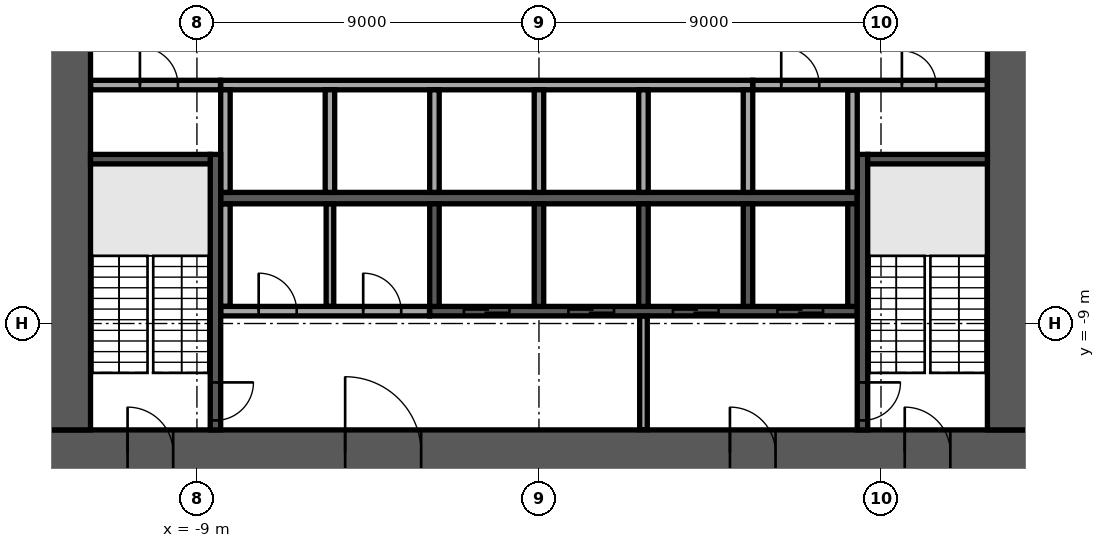
"""IFC4 building model, lengths in metres.
Left out: names, types, materials, properties, quantities, classifications, styles, units other than length and angle.
Written with IfcOpenShell. Run it as: python <this file> out.ifc"""

import sys

from ifc_helpers import new_model, si_unit, direction, frame, frame_2d, origin, place, context, subcontext, project, spatial, rectangle, extrude, element, fill, save


model = new_model("IFC4")
c1 = context("Model", 3, precision=1e-05, world=origin(), true_north=direction((0.0, 1.0)))
c2 = subcontext(c1, "Body", "Model", "MODEL_VIEW")
j1 = project(units=[si_unit("LENGTHUNIT", "METRE"), si_unit("PLANEANGLEUNIT", "RADIAN")], contexts=[c1])
p1 = place(None, origin())
s1 = spatial("IfcSite", under=j1, at=p1, CompositionType="ELEMENT")
p2 = place(p1, origin())
s2 = spatial("IfcBuilding", under=s1, at=p2, CompositionType="ELEMENT")
p3 = place(p2, frame((0.0, 0.0, 9.0)))
s3 = spatial("IfcBuildingStorey", under=s2, at=p3, CompositionType="ELEMENT", Elevation=9.0)
p4 = place(p3, frame((-13.0, -12.4, 0.0), z_axis=(0.0, 0.0, 1.0), x_axis=(1.0, 0.0, 0.0)))
e1 = element("IfcWall", 1, at=p4, inside=s3, PredefinedType="SHEAR", context=c2, shape_type="SweptSolid", body=[
    extrude(rectangle(XDim=26.0, YDim=1.2, at=frame_2d((13.0, 0.0))), origin(), (0.0, 0.0, 1.0), 4.1),
])
p5 = place(p4, frame((7.9, 0.0, 0.0)))
e2 = element("IfcOpeningElement", 2, at=p5, cuts=e1, PredefinedType="OPENING", context=c2, shape_type="SweptSolid", body=[
    extrude(rectangle(XDim=2.0, YDim=2.1, at=frame_2d((1.0, 1.05))), frame((0.0, 0.61, 0.0), z_axis=(0.0, -1.0, 0.0), x_axis=(1.0, 0.0, 0.0)), (0.0, 0.0, 1.0), 1.22),
])
p6 = place(p4, frame((18.025, 0.0, 0.0)))
e3 = element("IfcOpeningElement", 3, at=p6, cuts=e1, PredefinedType="OPENING", context=c2, shape_type="SweptSolid", body=[
    extrude(rectangle(XDim=1.2, YDim=2.1, at=frame_2d((0.6, 1.05))), frame((0.0, 0.61, 0.0), z_axis=(0.0, -1.0, 0.0), x_axis=(1.0, 0.0, 0.0)), (0.0, 0.0, 1.0), 1.22),
])
p7 = place(p4, frame((2.175, 0.0, 0.0)))
e4 = element("IfcOpeningElement", 4, at=p7, cuts=e1, PredefinedType="OPENING", context=c2, shape_type="SweptSolid", body=[
    extrude(rectangle(XDim=1.2, YDim=2.1, at=frame_2d((0.6, 1.05))), frame((0.0, 0.61, 0.0), z_axis=(0.0, -1.0, 0.0), x_axis=(1.0, 0.0, 0.0)), (0.0, 0.0, 1.0), 1.22),
])
p8 = place(p4, frame((22.625, 0.0, 0.0)))
e5 = element("IfcOpeningElement", 5, at=p8, cuts=e1, PredefinedType="OPENING", context=c2, shape_type="SweptSolid", body=[
    extrude(rectangle(XDim=1.2, YDim=2.1, at=frame_2d((0.6, 1.05))), frame((0.0, 0.61, 0.0), z_axis=(0.0, -1.0, 0.0), x_axis=(1.0, 0.0, 0.0)), (0.0, 0.0, 1.0), 1.22),
])
p9 = place(p3, frame((12.4, -11.8, 0.0), z_axis=(0.0, 0.0, 1.0), x_axis=(0.0, 1.0, 0.0)))
e6 = element("IfcWall", 6, at=p9, inside=s3, PredefinedType="SHEAR", context=c2, shape_type="SweptSolid", body=[
    extrude(rectangle(XDim=23.6, YDim=1.2, at=frame_2d((11.8, 0.0))), origin(), (0.0, 0.0, 1.0), 4.1),
])
p10 = place(p9, frame((10.6, 0.0, 0.0)))
e7 = element("IfcOpeningElement", 7, at=p10, cuts=e6, PredefinedType="OPENING", context=c2, shape_type="SweptSolid", body=[
    extrude(rectangle(XDim=2.4, YDim=2.4, at=frame_2d((1.2, 1.2))), frame((0.0, 0.61, 0.0), z_axis=(0.0, -1.0, 0.0), x_axis=(1.0, 0.0, 0.0)), (0.0, 0.0, 1.0), 1.22),
])
p11 = place(p3, frame((-12.4, -11.8, 0.0), z_axis=(0.0, 0.0, 1.0), x_axis=(0.0, 1.0, 0.0)))
e8 = element("IfcWall", 8, at=p11, inside=s3, PredefinedType="SHEAR", context=c2, shape_type="SweptSolid", body=[
    extrude(rectangle(XDim=23.6, YDim=1.2, at=frame_2d((11.8, 0.0))), origin(), (0.0, 0.0, 1.0), 4.1),
])
p12 = place(p11, frame((10.6, 0.0, 0.0)))
e9 = element("IfcOpeningElement", 9, at=p12, cuts=e8, PredefinedType="OPENING", context=c2, shape_type="SweptSolid", body=[
    extrude(rectangle(XDim=2.4, YDim=2.4, at=frame_2d((1.2, 1.2))), frame((0.0, 0.61, 0.0), z_axis=(0.0, -1.0, 0.0), x_axis=(1.0, 0.0, 0.0)), (0.0, 0.0, 1.0), 1.22),
])
p13 = place(p3, frame((-8.375, -5.7, 0.0), z_axis=(0.0, 0.0, 1.0), x_axis=(1.0, 0.0, 0.0)))
e10 = element("IfcWall", 10, at=p13, inside=s3, PredefinedType="SOLIDWALL", context=c2, shape_type="SweptSolid", body=[
    extrude(rectangle(XDim=16.75, YDim=0.3, at=frame_2d((8.375, 0.0))), origin(), (0.0, 0.0, 1.0), 4.1),
])
p14 = place(p3, frame((-8.375, -2.725, 0.0), z_axis=(0.0, 0.0, 1.0), x_axis=(1.0, 0.0, 0.0)))
e11 = element("IfcWall", 11, at=p14, inside=s3, PredefinedType="SOLIDWALL", context=c2, shape_type="SweptSolid", body=[
    extrude(rectangle(XDim=14.0, YDim=0.25, at=frame_2d((7.0, 0.0))), origin(), (0.0, 0.0, 1.0), 4.1),
])
for number, where, z_axis, x_axis in (
    (12, (-8.25, -5.55, 0.0), (0.0, 0.0, 1.0), (0.0, 1.0, 0.0)),
    (13, (-5.5, -5.55, 0.0), (0.0, 0.0, 1.0), (0.0, 1.0, 0.0)),
    (14, (-2.75, -5.55, 0.0), (0.0, 0.0, 1.0), (0.0, 1.0, 0.0)),
    (15, (0.0, -5.55, 0.0), (0.0, 0.0, 1.0), (0.0, 1.0, 0.0)),
    (16, (2.75, -5.55, 0.0), (0.0, 0.0, 1.0), (0.0, 1.0, 0.0)),
    (17, (5.5, -5.55, 0.0), (0.0, 0.0, 1.0), (0.0, 1.0, 0.0)),
):
    element("IfcWall", number, at=place(p3, frame(where, z_axis=z_axis, x_axis=x_axis)), inside=s3, PredefinedType="SOLIDWALL", context=c2, shape_type="SweptSolid", body=[
        extrude(rectangle(XDim=2.7, YDim=0.25, at=frame_2d((1.35, 0.0))), origin(), (0.0, 0.0, 1.0), 4.1),
    ])
p15 = place(p3, frame((-2.875, -8.675, 0.0), z_axis=(0.0, 0.0, 1.0), x_axis=(1.0, 0.0, 0.0)))
e18 = element("IfcWall", 18, at=p15, inside=s3, PredefinedType="SOLIDWALL", context=c2, shape_type="SweptSolid", body=[
    extrude(rectangle(XDim=11.25, YDim=0.25, at=frame_2d((5.625, 0.0))), origin(), (0.0, 0.0, 1.0), 4.1),
])
p16 = place(p15, frame((0.9, 0.0, 0.0)))
e19 = element("IfcOpeningElement", 19, at=p16, cuts=e18, PredefinedType="OPENING", context=c2, shape_type="SweptSolid", body=[
    extrude(rectangle(XDim=1.2, YDim=2.1, at=frame_2d((0.6, 1.05))), frame((0.0, 0.135, 0.0), z_axis=(0.0, -1.0, 0.0), x_axis=(1.0, 0.0, 0.0)), (0.0, 0.0, 1.0), 0.27),
])
p17 = place(p15, frame((3.65, 0.0, 0.0)))
e20 = element("IfcOpeningElement", 20, at=p17, cuts=e18, PredefinedType="OPENING", context=c2, shape_type="SweptSolid", body=[
    extrude(rectangle(XDim=1.2, YDim=2.1, at=frame_2d((0.6, 1.05))), frame((0.0, 0.135, 0.0), z_axis=(0.0, -1.0, 0.0), x_axis=(1.0, 0.0, 0.0)), (0.0, 0.0, 1.0), 0.27),
])
p18 = place(p15, frame((6.4, 0.0, 0.0)))
e21 = element("IfcOpeningElement", 21, at=p18, cuts=e18, PredefinedType="OPENING", context=c2, shape_type="SweptSolid", body=[
    extrude(rectangle(XDim=1.2, YDim=2.1, at=frame_2d((0.6, 1.05))), frame((0.0, 0.135, 0.0), z_axis=(0.0, -1.0, 0.0), x_axis=(1.0, 0.0, 0.0)), (0.0, 0.0, 1.0), 0.27),
])
p19 = place(p15, frame((9.15, 0.0, 0.0)))
e22 = element("IfcOpeningElement", 22, at=p19, cuts=e18, PredefinedType="OPENING", context=c2, shape_type="SweptSolid", body=[
    extrude(rectangle(XDim=1.2, YDim=2.1, at=frame_2d((0.6, 1.05))), frame((0.0, 0.135, 0.0), z_axis=(0.0, -1.0, 0.0), x_axis=(1.0, 0.0, 0.0)), (0.0, 0.0, 1.0), 0.27),
])
for number, where, z_axis, x_axis in (
    (23, (-2.75, -8.55, 0.0), (0.0, 0.0, 1.0), (0.0, 1.0, 0.0)),
    (24, (0.0, -8.55, 0.0), (0.0, 0.0, 1.0), (0.0, 1.0, 0.0)),
    (25, (2.75, -8.55, 0.0), (0.0, 0.0, 1.0), (0.0, 1.0, 0.0)),
    (26, (5.5, -8.55, 0.0), (0.0, 0.0, 1.0), (0.0, 1.0, 0.0)),
    (27, (8.25, -8.55, 0.0), (0.0, 0.0, 1.0), (0.0, 1.0, 0.0)),
):
    element("IfcWall", number, at=place(p3, frame(where, z_axis=z_axis, x_axis=x_axis)), inside=s3, PredefinedType="SOLIDWALL", context=c2, shape_type="SweptSolid", body=[
        extrude(rectangle(XDim=2.7, YDim=0.25, at=frame_2d((1.35, 0.0))), origin(), (0.0, 0.0, 1.0), 4.1),
    ])
p20 = place(p3, frame((-8.512, -4.55, 0.0), z_axis=(0.0, 0.0, 1.0), x_axis=(0.0, -1.0, 0.0)))
e28 = element("IfcWall", 28, at=p20, inside=s3, PredefinedType="SOLIDWALL", context=c2, shape_type="SweptSolid", body=[
    extrude(rectangle(XDim=7.25, YDim=0.275, at=frame_2d((3.625, 0.0))), origin(), (0.0, 0.0, 1.0), 4.1),
])
p21 = place(p20, frame((6.0, 0.0, 0.0)))
e29 = element("IfcOpeningElement", 29, at=p21, cuts=e28, PredefinedType="OPENING", context=c2, shape_type="SweptSolid", body=[
    extrude(rectangle(XDim=1.0, YDim=2.1, at=frame_2d((0.5, 1.05))), frame((0.0, 0.147, 0.0), z_axis=(0.0, -1.0, 0.0), x_axis=(1.0, 0.0, 0.0)), (0.0, 0.0, 1.0), 0.295),
])
p22 = place(p3, frame((-8.65, -4.675, 0.0), z_axis=(0.0, 0.0, 1.0), x_axis=(-1.0, 0.0, 0.0)))
e30 = element("IfcWall", 30, at=p22, inside=s3, PredefinedType="SOLIDWALL", context=c2, shape_type="SweptSolid", body=[
    extrude(rectangle(XDim=3.15, YDim=0.25, at=frame_2d((1.575, 0.0))), origin(), (0.0, 0.0, 1.0), 4.1),
])
p23 = place(p3, frame((8.512, -4.55, 0.0), z_axis=(0.0, 0.0, 1.0), x_axis=(0.0, -1.0, 0.0)))
e31 = element("IfcWall", 31, at=p23, inside=s3, PredefinedType="SOLIDWALL", context=c2, shape_type="SweptSolid", body=[
    extrude(rectangle(XDim=7.25, YDim=0.275, at=frame_2d((3.625, 0.0))), origin(), (0.0, 0.0, 1.0), 4.1),
])
p24 = place(p23, frame((6.0, 0.0, 0.0)))
e32 = element("IfcOpeningElement", 32, at=p24, cuts=e31, PredefinedType="OPENING", context=c2, shape_type="SweptSolid", body=[
    extrude(rectangle(XDim=1.0, YDim=2.1, at=frame_2d((0.5, 1.05))), frame((0.0, 0.147, 0.0), z_axis=(0.0, -1.0, 0.0), x_axis=(1.0, 0.0, 0.0)), (0.0, 0.0, 1.0), 0.295),
])
p25 = place(p3, frame((8.65, -4.675, 0.0), z_axis=(0.0, 0.0, 1.0), x_axis=(1.0, 0.0, 0.0)))
e33 = element("IfcWall", 33, at=p25, inside=s3, PredefinedType="SOLIDWALL", context=c2, shape_type="SweptSolid", body=[
    extrude(rectangle(XDim=3.15, YDim=0.25, at=frame_2d((1.575, 0.0))), origin(), (0.0, 0.0, 1.0), 4.1),
])
p26 = place(p3, frame((2.75, -11.795, 0.0), z_axis=(0.0, 0.0, 1.0), x_axis=(0.0, 1.0, 0.0)))
e34 = element("IfcWall", 34, at=p26, inside=s3, PredefinedType="PARTITIONING", context=c2, shape_type="SweptSolid", body=[
    extrude(rectangle(XDim=2.99, YDim=0.2, at=frame_2d((1.495, 0.0))), origin(), (0.0, 0.0, 1.0), 4.1),
])
p27 = place(p3, frame((-8.37, -8.675, 0.0), z_axis=(0.0, 0.0, 1.0), x_axis=(1.0, 0.0, 0.0)))
e35 = element("IfcWall", 35, at=p27, inside=s3, PredefinedType="PARTITIONING", context=c2, shape_type="SweptSolid", body=[
    extrude(rectangle(XDim=5.49, YDim=0.25, at=frame_2d((2.745, 0.0))), origin(), (0.0, 0.0, 1.0), 4.1),
])
p28 = place(p27, frame((0.995, 0.0, 0.0)))
e36 = element("IfcOpeningElement", 36, at=p28, cuts=e35, PredefinedType="OPENING", context=c2, shape_type="SweptSolid", body=[
    extrude(rectangle(XDim=1.0, YDim=2.1, at=frame_2d((0.5, 1.05))), frame((0.0, 0.135, 0.0), z_axis=(0.0, -1.0, 0.0), x_axis=(1.0, 0.0, 0.0)), (0.0, 0.0, 1.0), 0.27),
])
p29 = place(p27, frame((3.745, 0.0, 0.0)))
e37 = element("IfcOpeningElement", 37, at=p29, cuts=e35, PredefinedType="OPENING", context=c2, shape_type="SweptSolid", body=[
    extrude(rectangle(XDim=1.0, YDim=2.1, at=frame_2d((0.5, 1.05))), frame((0.0, 0.135, 0.0), z_axis=(0.0, -1.0, 0.0), x_axis=(1.0, 0.0, 0.0)), (0.0, 0.0, 1.0), 0.27),
])
p30 = place(p3, frame((-8.25, -8.545, 0.0), z_axis=(0.0, 0.0, 1.0), x_axis=(0.0, 1.0, 0.0)))
e38 = element("IfcWall", 38, at=p30, inside=s3, PredefinedType="PARTITIONING", context=c2, shape_type="SweptSolid", body=[
    extrude(rectangle(XDim=2.69, YDim=0.25, at=frame_2d((1.345, 0.0))), origin(), (0.0, 0.0, 1.0), 4.1),
])
p31 = place(p3, frame((-5.5, -8.545, 0.0), z_axis=(0.0, 0.0, 1.0), x_axis=(0.0, 1.0, 0.0)))
e39 = element("IfcWall", 39, at=p31, inside=s3, PredefinedType="PARTITIONING", context=c2, shape_type="SweptSolid", body=[
    extrude(rectangle(XDim=2.69, YDim=0.2, at=frame_2d((1.345, 0.0))), origin(), (0.0, 0.0, 1.0), 4.1),
])
p32 = place(p3, frame((8.25, -5.545, 0.0), z_axis=(0.0, 0.0, 1.0), x_axis=(0.0, 1.0, 0.0)))
e40 = element("IfcWall", 40, at=p32, inside=s3, PredefinedType="PARTITIONING", context=c2, shape_type="SweptSolid", body=[
    extrude(rectangle(XDim=2.69, YDim=0.25, at=frame_2d((1.345, 0.0))), origin(), (0.0, 0.0, 1.0), 4.1),
])
p33 = place(p3, frame((-11.795, -2.725, 0.0), z_axis=(0.0, 0.0, 1.0), x_axis=(1.0, 0.0, 0.0)))
e41 = element("IfcWall", 41, at=p33, inside=s3, PredefinedType="PARTITIONING", context=c2, shape_type="SweptSolid", body=[
    extrude(rectangle(XDim=3.415, YDim=0.25, at=frame_2d((1.708, 0.0))), origin(), (0.0, 0.0, 1.0), 4.1),
])
p34 = place(p33, frame((1.295, 0.0, 0.0)))
e42 = element("IfcOpeningElement", 42, at=p34, cuts=e41, PredefinedType="OPENING", context=c2, shape_type="SweptSolid", body=[
    extrude(rectangle(XDim=1.0, YDim=2.1, at=frame_2d((0.5, 1.05))), frame((0.0, 0.135, 0.0), z_axis=(0.0, -1.0, 0.0), x_axis=(1.0, 0.0, 0.0)), (0.0, 0.0, 1.0), 0.27),
])
p35 = place(p3, frame((5.63, -2.725, 0.0), z_axis=(0.0, 0.0, 1.0), x_axis=(1.0, 0.0, 0.0)))
e43 = element("IfcWall", 43, at=p35, inside=s3, PredefinedType="PARTITIONING", context=c2, shape_type="SweptSolid", body=[
    extrude(rectangle(XDim=6.165, YDim=0.25, at=frame_2d((3.083, 0.0))), origin(), (0.0, 0.0, 1.0), 4.1),
])
p36 = place(p35, frame((0.745, 0.0, 0.0)))
e44 = element("IfcOpeningElement", 44, at=p36, cuts=e43, PredefinedType="OPENING", context=c2, shape_type="SweptSolid", body=[
    extrude(rectangle(XDim=1.0, YDim=2.1, at=frame_2d((0.5, 1.05))), frame((0.0, 0.135, 0.0), z_axis=(0.0, -1.0, 0.0), x_axis=(1.0, 0.0, 0.0)), (0.0, 0.0, 1.0), 0.27),
])
p37 = place(p35, frame((3.92, 0.0, 0.0)))
e45 = element("IfcOpeningElement", 45, at=p37, cuts=e43, PredefinedType="OPENING", context=c2, shape_type="SweptSolid", body=[
    extrude(rectangle(XDim=0.9, YDim=2.1, at=frame_2d((0.45, 1.05))), frame((0.0, 0.135, 0.0), z_axis=(0.0, -1.0, 0.0), x_axis=(1.0, 0.0, 0.0)), (0.0, 0.0, 1.0), 0.27),
])
p38 = place(p5, origin())
e46 = element("IfcDoor", 46, at=p38, inside=s3, OperationType="SINGLE_SWING_LEFT", PredefinedType="DOOR", context=c2, shape_type="SweptSolid", body=[
    extrude(rectangle(XDim=2.0, YDim=2.1, at=frame_2d((1.0, 1.05))), frame((0.0, 0.025, 0.0), z_axis=(0.0, -1.0, 0.0), x_axis=(1.0, 0.0, 0.0)), (0.0, 0.0, 1.0), 0.05),
])
fill(e2, e46)
p39 = place(p6, origin())
e47 = element("IfcDoor", 47, at=p39, inside=s3, OperationType="SINGLE_SWING_LEFT", PredefinedType="DOOR", context=c2, shape_type="SweptSolid", body=[
    extrude(rectangle(XDim=1.2, YDim=2.1, at=frame_2d((0.6, 1.05))), frame((0.0, 0.025, 0.0), z_axis=(0.0, -1.0, 0.0), x_axis=(1.0, 0.0, 0.0)), (0.0, 0.0, 1.0), 0.05),
])
fill(e3, e47)
p40 = place(p7, origin())
e48 = element("IfcDoor", 48, at=p40, inside=s3, OperationType="SINGLE_SWING_LEFT", PredefinedType="DOOR", context=c2, shape_type="SweptSolid", body=[
    extrude(rectangle(XDim=1.2, YDim=2.1, at=frame_2d((0.6, 1.05))), frame((0.0, 0.025, 0.0), z_axis=(0.0, -1.0, 0.0), x_axis=(1.0, 0.0, 0.0)), (0.0, 0.0, 1.0), 0.05),
])
fill(e4, e48)
p41 = place(p8, origin())
e49 = element("IfcDoor", 49, at=p41, inside=s3, OperationType="SINGLE_SWING_LEFT", PredefinedType="DOOR", context=c2, shape_type="SweptSolid", body=[
    extrude(rectangle(XDim=1.2, YDim=2.1, at=frame_2d((0.6, 1.05))), frame((0.0, 0.025, 0.0), z_axis=(0.0, -1.0, 0.0), x_axis=(1.0, 0.0, 0.0)), (0.0, 0.0, 1.0), 0.05),
])
fill(e5, e49)
p42 = place(p16, origin())
e50 = element("IfcDoor", 50, at=p42, inside=s3, OperationType="DOUBLE_DOOR_SLIDING", PredefinedType="DOOR", context=c2, shape_type="SweptSolid", body=[
    extrude(rectangle(XDim=1.2, YDim=2.1, at=frame_2d((0.6, 1.05))), frame((0.0, 0.025, 0.0), z_axis=(0.0, -1.0, 0.0), x_axis=(1.0, 0.0, 0.0)), (0.0, 0.0, 1.0), 0.05),
])
fill(e19, e50)
p43 = place(p17, origin())
e51 = element("IfcDoor", 51, at=p43, inside=s3, OperationType="DOUBLE_DOOR_SLIDING", PredefinedType="DOOR", context=c2, shape_type="SweptSolid", body=[
    extrude(rectangle(XDim=1.2, YDim=2.1, at=frame_2d((0.6, 1.05))), frame((0.0, 0.025, 0.0), z_axis=(0.0, -1.0, 0.0), x_axis=(1.0, 0.0, 0.0)), (0.0, 0.0, 1.0), 0.05),
])
fill(e20, e51)
p44 = place(p18, origin())
e52 = element("IfcDoor", 52, at=p44, inside=s3, OperationType="DOUBLE_DOOR_SLIDING", PredefinedType="DOOR", context=c2, shape_type="SweptSolid", body=[
    extrude(rectangle(XDim=1.2, YDim=2.1, at=frame_2d((0.6, 1.05))), frame((0.0, 0.025, 0.0), z_axis=(0.0, -1.0, 0.0), x_axis=(1.0, 0.0, 0.0)), (0.0, 0.0, 1.0), 0.05),
])
fill(e21, e52)
p45 = place(p19, origin())
e53 = element("IfcDoor", 53, at=p45, inside=s3, OperationType="DOUBLE_DOOR_SLIDING", PredefinedType="DOOR", context=c2, shape_type="SweptSolid", body=[
    extrude(rectangle(XDim=1.2, YDim=2.1, at=frame_2d((0.6, 1.05))), frame((0.0, 0.025, 0.0), z_axis=(0.0, -1.0, 0.0), x_axis=(1.0, 0.0, 0.0)), (0.0, 0.0, 1.0), 0.05),
])
fill(e22, e53)
p46 = place(p21, origin())
e54 = element("IfcDoor", 54, at=p46, inside=s3, OperationType="SINGLE_SWING_LEFT", PredefinedType="DOOR", context=c2, shape_type="SweptSolid", body=[
    extrude(rectangle(XDim=1.0, YDim=2.1, at=frame_2d((0.5, 1.05))), frame((0.0, 0.025, 0.0), z_axis=(0.0, -1.0, 0.0), x_axis=(1.0, 0.0, 0.0)), (0.0, 0.0, 1.0), 0.05),
])
fill(e29, e54)
p47 = place(p24, origin())
e55 = element("IfcDoor", 55, at=p47, inside=s3, OperationType="SINGLE_SWING_LEFT", PredefinedType="DOOR", context=c2, shape_type="SweptSolid", body=[
    extrude(rectangle(XDim=1.0, YDim=2.1, at=frame_2d((0.5, 1.05))), frame((0.0, 0.025, 0.0), z_axis=(0.0, -1.0, 0.0), x_axis=(1.0, 0.0, 0.0)), (0.0, 0.0, 1.0), 0.05),
])
fill(e32, e55)
p48 = place(p28, origin())
e56 = element("IfcDoor", 56, at=p48, inside=s3, OperationType="SINGLE_SWING_LEFT", PredefinedType="DOOR", context=c2, shape_type="SweptSolid", body=[
    extrude(rectangle(XDim=1.0, YDim=2.1, at=frame_2d((0.5, 1.05))), frame((0.0, 0.025, 0.0), z_axis=(0.0, -1.0, 0.0), x_axis=(1.0, 0.0, 0.0)), (0.0, 0.0, 1.0), 0.05),
])
fill(e36, e56)
p49 = place(p29, origin())
e57 = element("IfcDoor", 57, at=p49, inside=s3, OperationType="SINGLE_SWING_LEFT", PredefinedType="DOOR", context=c2, shape_type="SweptSolid", body=[
    extrude(rectangle(XDim=1.0, YDim=2.1, at=frame_2d((0.5, 1.05))), frame((0.0, 0.025, 0.0), z_axis=(0.0, -1.0, 0.0), x_axis=(1.0, 0.0, 0.0)), (0.0, 0.0, 1.0), 0.05),
])
fill(e37, e57)
p50 = place(p34, origin())
e58 = element("IfcDoor", 58, at=p50, inside=s3, OperationType="SINGLE_SWING_LEFT", PredefinedType="DOOR", context=c2, shape_type="SweptSolid", body=[
    extrude(rectangle(XDim=1.0, YDim=2.1, at=frame_2d((0.5, 1.05))), frame((0.0, 0.025, 0.0), z_axis=(0.0, -1.0, 0.0), x_axis=(1.0, 0.0, 0.0)), (0.0, 0.0, 1.0), 0.05),
])
fill(e42, e58)
p51 = place(p36, origin())
e59 = element("IfcDoor", 59, at=p51, inside=s3, OperationType="SINGLE_SWING_LEFT", PredefinedType="DOOR", context=c2, shape_type="SweptSolid", body=[
    extrude(rectangle(XDim=1.0, YDim=2.1, at=frame_2d((0.5, 1.05))), frame((0.0, 0.025, 0.0), z_axis=(0.0, -1.0, 0.0), x_axis=(1.0, 0.0, 0.0)), (0.0, 0.0, 1.0), 0.05),
])
fill(e44, e59)
p52 = place(p37, origin())
e60 = element("IfcDoor", 60, at=p52, inside=s3, OperationType="SINGLE_SWING_LEFT", PredefinedType="DOOR", context=c2, shape_type="SweptSolid", body=[
    extrude(rectangle(XDim=0.9, YDim=2.1, at=frame_2d((0.45, 1.05))), frame((0.0, 0.025, 0.0), z_axis=(0.0, -1.0, 0.0), x_axis=(1.0, 0.0, 0.0)), (0.0, 0.0, 1.0), 0.05),
])
fill(e45, e60)
save(model, sys.argv[1])
